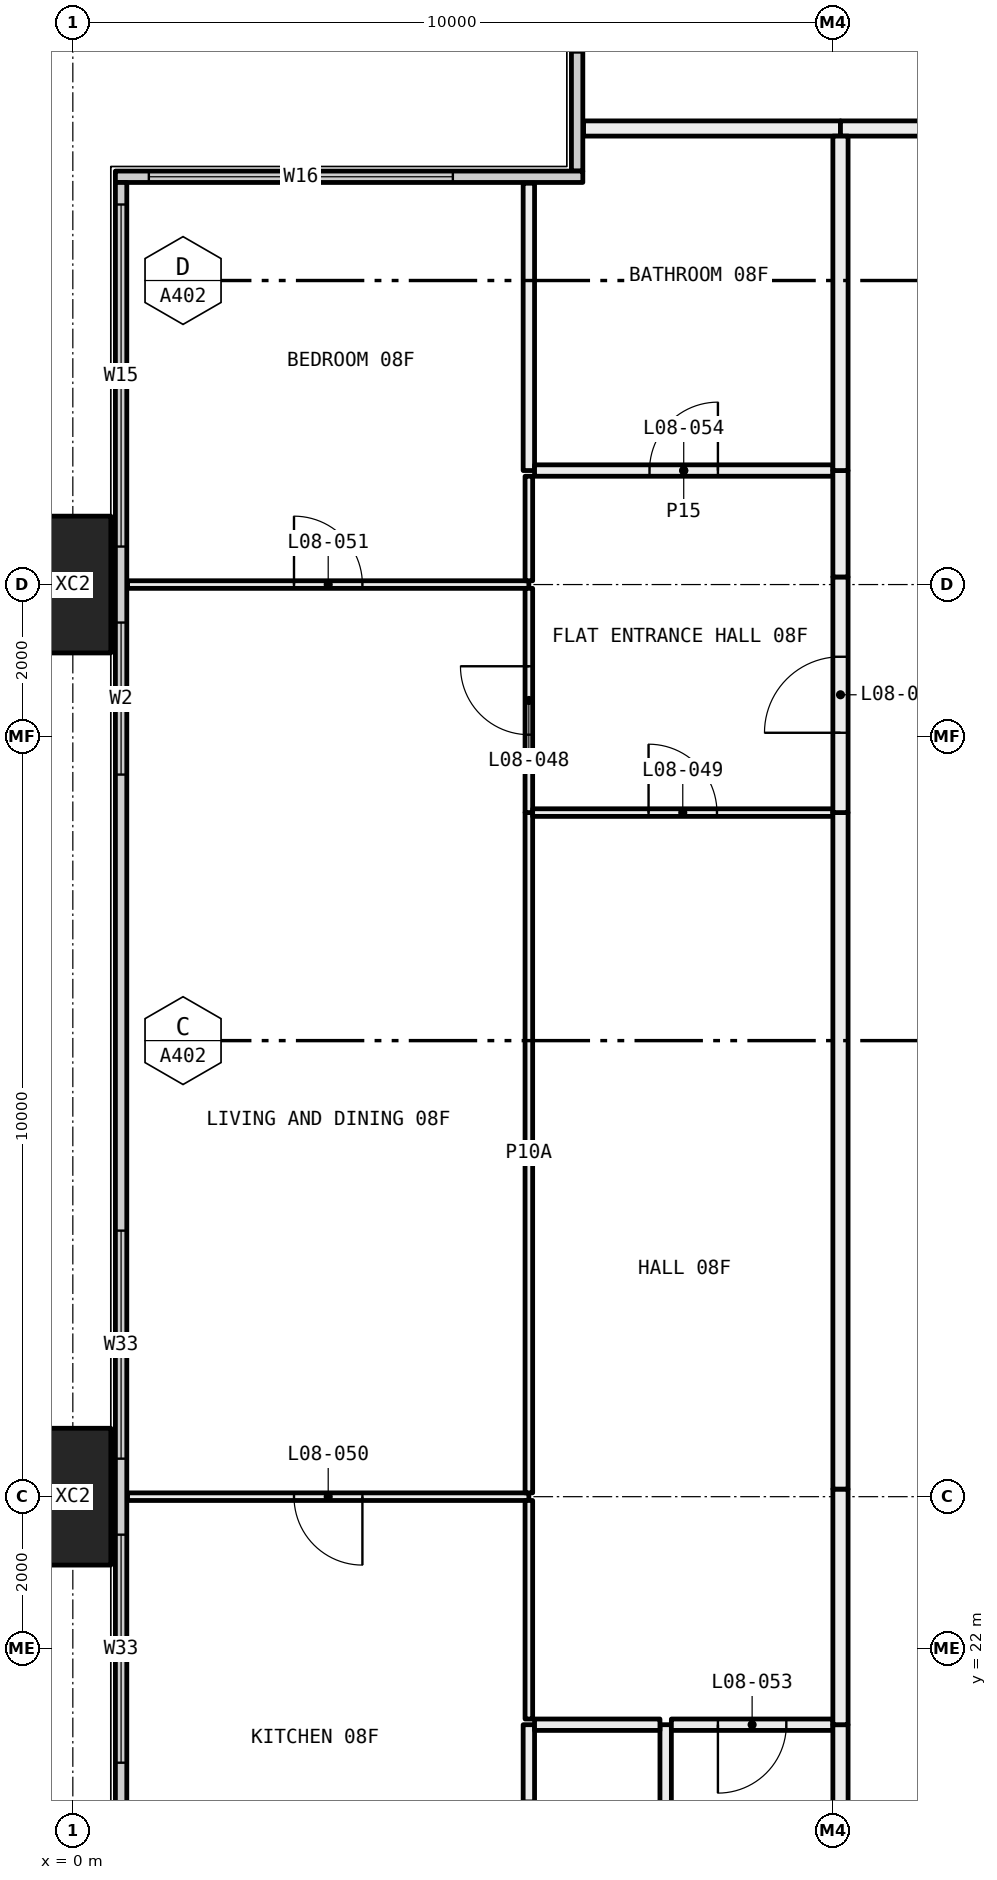
"""IFC4 building model, lengths in metres.
Left out: names, types, materials, properties, quantities, classifications, styles, units other than length and angle.
Written with IfcOpenShell. Run it as: python <this file> out.ifc"""

import sys

from ifc_helpers import new_model, si_unit, direction, frame, frame_2d, origin, origin_2d, place, context, subcontext, project, spatial, rectangle, hollow_rectangle, extrude, element, fill, save


model = new_model("IFC4")
c1 = context("Model", 3, precision=1e-05, world=origin(), true_north=direction((0.0, 1.0)))
c2 = subcontext(c1, "Body", "Model", "MODEL_VIEW")
j1 = project(units=[si_unit("LENGTHUNIT", "METRE"), si_unit("PLANEANGLEUNIT", "RADIAN")], contexts=[c1])
p1 = place(None, origin())
s1 = spatial("IfcSite", under=j1, at=p1, CompositionType="ELEMENT")
p2 = place(p1, origin())
s2 = spatial("IfcBuilding", under=s1, at=p2, CompositionType="ELEMENT")
p3 = place(p2, frame((0.0, 0.0, 40.35)))
s3 = spatial("IfcBuildingStorey", under=s2, at=p3, CompositionType="ELEMENT", Elevation=40.35)
for number, where, z_axis, x_axis in (
    (1, (0.0, 24.0, -0.4), (0.0, 0.0, 1.0), (0.0, 1.0, 0.0)),
    (2, (0.0, 36.0, -0.4), (0.0, 0.0, 1.0), (0.0, 1.0, 0.0)),
):
    element("IfcColumn", number, at=place(p3, frame(where, z_axis=z_axis, x_axis=x_axis)), inside=s3, PredefinedType="COLUMN", context=c2, shape_type="SweptSolid", body=[
        extrude(hollow_rectangle(XDim=1.8, YDim=1.0, WallThickness=0.07, at=origin_2d()), origin(), (0.0, 0.0, 1.0), 3.45),
    ])
p4 = place(p3, frame((6.635, 41.44, 0.0), z_axis=(0.0, 0.0, 1.0), x_axis=(0.0, 1.0, 0.0)))
e3 = element("IfcWall", 3, at=p4, inside=s3, PredefinedType="ELEMENTEDWALL", context=c2, shape_type="SweptSolid", body=[
    extrude(rectangle(XDim=5.85, YDim=0.15, at=frame_2d((2.925, 0.0))), origin(), (0.0, 0.0, 1.0), 3.05),
])
p5 = place(p4, frame((1.56, 0.0, 0.45)))
e4 = element("IfcOpeningElement", 4, at=p5, cuts=e3, PredefinedType="OPENING", context=c2, shape_type="SweptSolid", body=[
    extrude(rectangle(XDim=4.0, YDim=2.55, at=frame_2d((2.0, 1.275))), frame((0.0, 0.085, 0.0), z_axis=(0.0, -1.0, 0.0), x_axis=(1.0, 0.0, 0.0)), (0.0, 0.0, 1.0), 0.17),
])
p6 = place(p3, frame((0.56, 41.365, 0.0), z_axis=(0.0, 0.0, 1.0), x_axis=(1.0, 0.0, 0.0)))
e5 = element("IfcWall", 5, at=p6, inside=s3, PredefinedType="ELEMENTEDWALL", context=c2, shape_type="SweptSolid", body=[
    extrude(rectangle(XDim=6.15, YDim=0.15, at=frame_2d((3.075, 0.0))), origin(), (0.0, 0.0, 1.0), 3.05),
])
p7 = place(p6, frame((0.44, 0.0, 0.45)))
e6 = element("IfcOpeningElement", 6, at=p7, cuts=e5, PredefinedType="OPENING", context=c2, shape_type="SweptSolid", body=[
    extrude(rectangle(XDim=4.0, YDim=2.55, at=frame_2d((2.0, 1.275))), frame((0.0, 0.085, 0.0), z_axis=(0.0, -1.0, 0.0), x_axis=(1.0, 0.0, 0.0)), (0.0, 0.0, 1.0), 0.17),
])
p8 = place(p3, frame((0.635, 6.71, 0.0), z_axis=(0.0, 0.0, 1.0), x_axis=(0.0, 1.0, 0.0)))
e7 = element("IfcWall", 7, at=p8, inside=s3, PredefinedType="ELEMENTEDWALL", context=c2, shape_type="SweptSolid", body=[
    extrude(rectangle(XDim=34.58, YDim=0.15, at=frame_2d((17.29, 0.0))), origin(), (0.0, 0.0, 1.0), 3.05),
])
p9 = place(p8, frame((0.29, 0.0, 0.45)))
e8 = element("IfcOpeningElement", 8, at=p9, cuts=e7, PredefinedType="OPENING", context=c2, shape_type="SweptSolid", body=[
    extrude(rectangle(XDim=4.5, YDim=2.55, at=frame_2d((2.25, 1.275))), frame((0.0, 0.085, 0.0), z_axis=(0.0, -1.0, 0.0), x_axis=(1.0, 0.0, 0.0)), (0.0, 0.0, 1.0), 0.17),
])
p10 = place(p8, frame((5.79, 0.0, 0.45)))
e9 = element("IfcOpeningElement", 9, at=p10, cuts=e7, PredefinedType="OPENING", context=c2, shape_type="SweptSolid", body=[
    extrude(rectangle(XDim=3.0, YDim=2.55, at=frame_2d((1.5, 1.275))), frame((0.0, 0.085, 0.0), z_axis=(0.0, -1.0, 0.0), x_axis=(1.0, 0.0, 0.0)), (0.0, 0.0, 1.0), 0.17),
])
p11 = place(p8, frame((13.79, 0.0, 0.45)))
e10 = element("IfcOpeningElement", 10, at=p11, cuts=e7, PredefinedType="OPENING", context=c2, shape_type="SweptSolid", body=[
    extrude(rectangle(XDim=3.0, YDim=2.55, at=frame_2d((1.5, 1.275))), frame((0.0, 0.085, 0.0), z_axis=(0.0, -1.0, 0.0), x_axis=(1.0, 0.0, 0.0)), (0.0, 0.0, 1.0), 0.17),
])
p12 = place(p8, frame((17.79, 0.0, 0.45)))
e11 = element("IfcOpeningElement", 11, at=p12, cuts=e7, PredefinedType="OPENING", context=c2, shape_type="SweptSolid", body=[
    extrude(rectangle(XDim=3.0, YDim=2.55, at=frame_2d((1.5, 1.275))), frame((0.0, 0.085, 0.0), z_axis=(0.0, -1.0, 0.0), x_axis=(1.0, 0.0, 0.0)), (0.0, 0.0, 1.0), 0.17),
])
p13 = place(p8, frame((26.79, 0.0, 0.45)))
e12 = element("IfcOpeningElement", 12, at=p13, cuts=e7, PredefinedType="OPENING", context=c2, shape_type="SweptSolid", body=[
    extrude(rectangle(XDim=2.0, YDim=2.55, at=frame_2d((1.0, 1.275))), frame((0.0, 0.085, 0.0), z_axis=(0.0, -1.0, 0.0), x_axis=(1.0, 0.0, 0.0)), (0.0, 0.0, 1.0), 0.17),
])
p14 = place(p8, frame((29.79, 0.0, 0.45)))
e13 = element("IfcOpeningElement", 13, at=p14, cuts=e7, PredefinedType="OPENING", context=c2, shape_type="SweptSolid", body=[
    extrude(rectangle(XDim=4.5, YDim=2.55, at=frame_2d((2.25, 1.275))), frame((0.0, 0.085, 0.0), z_axis=(0.0, -1.0, 0.0), x_axis=(1.0, 0.0, 0.0)), (0.0, 0.0, 1.0), 0.17),
])
p15 = place(p3, frame((6.72, 42.0, 0.0), z_axis=(0.0, 0.0, 1.0), x_axis=(1.0, 0.0, 0.0)))
e14 = element("IfcWall", 14, at=p15, inside=s3, PredefinedType="PARTITIONING", context=c2, shape_type="SweptSolid", body=[
    extrude(rectangle(XDim=3.38, YDim=0.2, at=frame_2d((1.69, 0.0))), origin(), (0.0, 0.0, 1.0), 3.05),
])
p16 = place(p3, frame((10.1, 42.0, 0.0), z_axis=(0.0, 0.0, 1.0), x_axis=(1.0, 0.0, 0.0)))
e15 = element("IfcWall", 15, at=p16, inside=s3, PredefinedType="PARTITIONING", context=c2, shape_type="SweptSolid", body=[
    extrude(rectangle(XDim=1.9, YDim=0.2, at=frame_2d((0.95, 0.0))), origin(), (0.0, 0.0, 1.0), 3.05),
])
p17 = place(p3, frame((6.0, 24.0, 0.0), z_axis=(0.0, 0.0, 1.0), x_axis=(-1.0, 0.0, 0.0)))
e16 = element("IfcWall", 16, at=p17, inside=s3, PredefinedType="PARTITIONING", context=c2, shape_type="SweptSolid", body=[
    extrude(rectangle(XDim=5.28, YDim=0.1, at=frame_2d((2.64, 0.0))), origin(), (0.0, 0.0, 1.0), 2.45),
])
p18 = place(p17, frame((2.19, 0.0, 0.0)))
e17 = element("IfcOpeningElement", 17, at=p18, cuts=e16, PredefinedType="OPENING", context=c2, shape_type="SweptSolid", body=[
    extrude(rectangle(XDim=0.9, YDim=2.1, at=frame_2d((0.45, 1.05))), frame((0.0, 0.06, 0.0), z_axis=(0.0, -1.0, 0.0), x_axis=(1.0, 0.0, 0.0)), (0.0, 0.0, 1.0), 0.12),
])
p19 = place(p3, frame((6.0, 18.1, 0.0), z_axis=(0.0, 0.0, 1.0), x_axis=(0.0, 1.0, 0.0)))
e18 = element("IfcWall", 18, at=p19, inside=s3, PredefinedType="PARTITIONING", context=c2, shape_type="SweptSolid", body=[
    extrude(rectangle(XDim=2.9, YDim=0.15, at=frame_2d((1.45, 0.0))), origin(), (0.0, 0.0, 1.0), 3.05),
])
p20 = place(p19, frame((1.0, 0.0, 0.0)))
e19 = element("IfcOpeningElement", 19, at=p20, cuts=e18, PredefinedType="OPENING", context=c2, shape_type="SweptSolid", body=[
    extrude(rectangle(XDim=0.9, YDim=2.1, at=frame_2d((0.45, 1.05))), frame((0.0, 0.085, 0.0), z_axis=(0.0, -1.0, 0.0), x_axis=(1.0, 0.0, 0.0)), (0.0, 0.0, 1.0), 0.17),
])
p21 = place(p3, frame((6.0, 21.075, 0.0), z_axis=(0.0, 0.0, 1.0), x_axis=(0.0, 1.0, 0.0)))
e20 = element("IfcWall", 20, at=p21, inside=s3, PredefinedType="PARTITIONING", context=c2, shape_type="SweptSolid", body=[
    extrude(rectangle(XDim=2.875, YDim=0.1, at=frame_2d((1.438, 0.0))), origin(), (0.0, 0.0, 1.0), 2.45),
])
p22 = place(p3, frame((6.0, 36.0, 0.0), z_axis=(0.0, 0.0, 1.0), x_axis=(-1.0, 0.0, 0.0)))
e21 = element("IfcWall", 21, at=p22, inside=s3, PredefinedType="PARTITIONING", context=c2, shape_type="SweptSolid", body=[
    extrude(rectangle(XDim=5.28, YDim=0.1, at=frame_2d((2.64, 0.0))), origin(), (0.0, 0.0, 1.0), 2.45),
])
p23 = place(p22, frame((2.19, 0.0, 0.0)))
e22 = element("IfcOpeningElement", 22, at=p23, cuts=e21, PredefinedType="OPENING", context=c2, shape_type="SweptSolid", body=[
    extrude(rectangle(XDim=0.9, YDim=2.1, at=frame_2d((0.45, 1.05))), frame((0.0, 0.06, 0.0), z_axis=(0.0, -1.0, 0.0), x_axis=(1.0, 0.0, 0.0)), (0.0, 0.0, 1.0), 0.12),
])
p24 = place(p3, frame((6.0, 24.05, 0.0), z_axis=(0.0, 0.0, 1.0), x_axis=(0.0, 1.0, 0.0)))
e23 = element("IfcWall", 23, at=p24, inside=s3, PredefinedType="PARTITIONING", context=c2, shape_type="SweptSolid", body=[
    extrude(rectangle(XDim=8.95, YDim=0.1, at=frame_2d((4.475, 0.0))), origin(), (0.0, 0.0, 1.0), 2.45),
])
p25 = place(p3, frame((6.0, 33.0, 0.0), z_axis=(0.0, 0.0, 1.0), x_axis=(0.0, 1.0, 0.0)))
e24 = element("IfcWall", 24, at=p25, inside=s3, PredefinedType="PARTITIONING", context=c2, shape_type="SweptSolid", body=[
    extrude(rectangle(XDim=2.95, YDim=0.1, at=frame_2d((1.475, 0.0))), origin(), (0.0, 0.0, 1.0), 2.45),
])
p26 = place(p25, frame((1.025, 0.0, 0.0)))
e25 = element("IfcOpeningElement", 25, at=p26, cuts=e24, PredefinedType="OPENING", context=c2, shape_type="SweptSolid", body=[
    extrude(rectangle(XDim=0.9, YDim=2.1, at=frame_2d((0.45, 1.05))), frame((0.0, 0.06, 0.0), z_axis=(0.0, -1.0, 0.0), x_axis=(1.0, 0.0, 0.0)), (0.0, 0.0, 1.0), 0.12),
])
p27 = place(p3, frame((6.0, 36.05, 0.0), z_axis=(0.0, 0.0, 1.0), x_axis=(0.0, 1.0, 0.0)))
e26 = element("IfcWall", 26, at=p27, inside=s3, PredefinedType="PARTITIONING", context=c2, shape_type="SweptSolid", body=[
    extrude(rectangle(XDim=1.375, YDim=0.1, at=frame_2d((0.688, 0.0))), origin(), (0.0, 0.0, 1.0), 2.45),
])
p28 = place(p3, frame((6.0, 37.5, 0.0), z_axis=(0.0, 0.0, 1.0), x_axis=(0.0, 1.0, 0.0)))
e27 = element("IfcWall", 27, at=p28, inside=s3, PredefinedType="PARTITIONING", context=c2, shape_type="SweptSolid", body=[
    extrude(rectangle(XDim=3.78, YDim=0.15, at=frame_2d((1.89, 0.0))), origin(), (0.0, 0.0, 1.0), 3.05),
])
p29 = place(p3, frame((7.8, 18.1, 0.0), z_axis=(0.0, 0.0, 1.0), x_axis=(0.0, 1.0, 0.0)))
e28 = element("IfcWall", 28, at=p29, inside=s3, PredefinedType="PARTITIONING", context=c2, shape_type="SweptSolid", body=[
    extrude(rectangle(XDim=2.9, YDim=0.15, at=frame_2d((1.45, 0.0))), origin(), (0.0, 0.0, 1.0), 3.05),
])
p30 = place(p3, frame((7.725, 21.0, 0.0), z_axis=(0.0, 0.0, 1.0), x_axis=(-1.0, 0.0, 0.0)))
e29 = element("IfcWall", 29, at=p30, inside=s3, PredefinedType="PARTITIONING", context=c2, shape_type="SweptSolid", body=[
    extrude(rectangle(XDim=1.65, YDim=0.15, at=frame_2d((0.825, 0.0))), origin(), (0.0, 0.0, 1.0), 3.05),
])
p31 = place(p3, frame((10.0, 21.0, 0.0), z_axis=(0.0, 0.0, 1.0), x_axis=(-1.0, 0.0, 0.0)))
e30 = element("IfcWall", 30, at=p31, inside=s3, PredefinedType="PARTITIONING", context=c2, shape_type="SweptSolid", body=[
    extrude(rectangle(XDim=2.125, YDim=0.15, at=frame_2d((1.062, 0.0))), origin(), (0.0, 0.0, 1.0), 3.05),
])
p32 = place(p31, frame((0.613, 0.0, 0.0)))
e31 = element("IfcOpeningElement", 31, at=p32, cuts=e30, PredefinedType="OPENING", context=c2, shape_type="SweptSolid", body=[
    extrude(rectangle(XDim=0.9, YDim=2.1, at=frame_2d((0.45, 1.05))), frame((0.0, 0.085, 0.0), z_axis=(0.0, -1.0, 0.0), x_axis=(1.0, 0.0, 0.0)), (0.0, 0.0, 1.0), 0.17),
])
p33 = place(p3, frame((10.1, 18.1, 0.0), z_axis=(0.0, 0.0, 1.0), x_axis=(0.0, 1.0, 0.0)))
e32 = element("IfcWall", 32, at=p33, inside=s3, PredefinedType="PARTITIONING", context=c2, shape_type="SweptSolid", body=[
    extrude(rectangle(XDim=2.9, YDim=0.2, at=frame_2d((1.45, 0.0))), origin(), (0.0, 0.0, 1.0), 3.05),
])
p34 = place(p3, frame((10.0, 33.0, 0.0), z_axis=(0.0, 0.0, 1.0), x_axis=(-1.0, 0.0, 0.0)))
e33 = element("IfcWall", 33, at=p34, inside=s3, PredefinedType="PARTITIONING", context=c2, shape_type="SweptSolid", body=[
    extrude(rectangle(XDim=3.95, YDim=0.1, at=frame_2d((1.975, 0.0))), origin(), (0.0, 0.0, 1.0), 3.05),
])
p35 = place(p34, frame((1.525, 0.0, 0.0)))
e34 = element("IfcOpeningElement", 34, at=p35, cuts=e33, PredefinedType="OPENING", context=c2, shape_type="SweptSolid", body=[
    extrude(rectangle(XDim=0.9, YDim=2.1, at=frame_2d((0.45, 1.05))), frame((0.0, 0.06, 0.0), z_axis=(0.0, -1.0, 0.0), x_axis=(1.0, 0.0, 0.0)), (0.0, 0.0, 1.0), 0.12),
])
p36 = place(p3, frame((10.1, 21.0, 0.0), z_axis=(0.0, 0.0, 1.0), x_axis=(0.0, 1.0, 0.0)))
e35 = element("IfcWall", 35, at=p36, inside=s3, PredefinedType="PARTITIONING", context=c2, shape_type="SweptSolid", body=[
    extrude(rectangle(XDim=3.1, YDim=0.2, at=frame_2d((1.55, 0.0))), origin(), (0.0, 0.0, 1.0), 2.45),
])
p37 = place(p3, frame((10.1, 24.1, 0.0), z_axis=(0.0, 0.0, 1.0), x_axis=(0.0, 1.0, 0.0)))
e36 = element("IfcWall", 36, at=p37, inside=s3, PredefinedType="PARTITIONING", context=c2, shape_type="SweptSolid", body=[
    extrude(rectangle(XDim=8.9, YDim=0.2, at=frame_2d((4.45, 0.0))), origin(), (0.0, 0.0, 1.0), 3.05),
])
p38 = place(p3, frame((10.0, 37.5, 0.0), z_axis=(0.0, 0.0, 1.0), x_axis=(-1.0, 0.0, 0.0)))
e37 = element("IfcWall", 37, at=p38, inside=s3, PredefinedType="PARTITIONING", context=c2, shape_type="SweptSolid", body=[
    extrude(rectangle(XDim=3.925, YDim=0.15, at=frame_2d((1.962, 0.0))), origin(), (0.0, 0.0, 1.0), 3.05),
])
p39 = place(p38, frame((1.512, 0.0, 0.0)))
e38 = element("IfcOpeningElement", 38, at=p39, cuts=e37, PredefinedType="OPENING", context=c2, shape_type="SweptSolid", body=[
    extrude(rectangle(XDim=0.9, YDim=2.1, at=frame_2d((0.45, 1.05))), frame((0.0, 0.085, 0.0), z_axis=(0.0, -1.0, 0.0), x_axis=(1.0, 0.0, 0.0)), (0.0, 0.0, 1.0), 0.17),
])
p40 = place(p3, frame((10.1, 33.0, 0.0), z_axis=(0.0, 0.0, 1.0), x_axis=(0.0, 1.0, 0.0)))
e39 = element("IfcWall", 39, at=p40, inside=s3, PredefinedType="PARTITIONING", context=c2, shape_type="SweptSolid", body=[
    extrude(rectangle(XDim=3.1, YDim=0.2, at=frame_2d((1.55, 0.0))), origin(), (0.0, 0.0, 1.0), 2.45),
])
p41 = place(p40, frame((1.05, 0.0, 0.0)))
e40 = element("IfcOpeningElement", 40, at=p41, cuts=e39, PredefinedType="OPENING", context=c2, shape_type="SweptSolid", body=[
    extrude(rectangle(XDim=1.0, YDim=2.1, at=frame_2d((0.5, 1.05))), frame((0.0, 0.11, 0.0), z_axis=(0.0, -1.0, 0.0), x_axis=(1.0, 0.0, 0.0)), (0.0, 0.0, 1.0), 0.22),
])
p42 = place(p3, frame((10.1, 36.1, 0.0), z_axis=(0.0, 0.0, 1.0), x_axis=(0.0, 1.0, 0.0)))
e41 = element("IfcWall", 41, at=p42, inside=s3, PredefinedType="PARTITIONING", context=c2, shape_type="SweptSolid", body=[
    extrude(rectangle(XDim=1.4, YDim=0.2, at=frame_2d((0.7, 0.0))), origin(), (0.0, 0.0, 1.0), 3.05),
])
p43 = place(p3, frame((10.1, 37.5, 0.0), z_axis=(0.0, 0.0, 1.0), x_axis=(0.0, 1.0, 0.0)))
e42 = element("IfcWall", 42, at=p43, inside=s3, PredefinedType="PARTITIONING", context=c2, shape_type="SweptSolid", body=[
    extrude(rectangle(XDim=4.4, YDim=0.2, at=frame_2d((2.2, 0.0))), origin(), (0.0, 0.0, 1.0), 3.05),
])
p44 = place(p7, origin())
e43 = element("IfcWindow", 43, at=p44, inside=s3, PartitioningType="SINGLE_PANEL", PredefinedType="WINDOW", context=c2, shape_type="SweptSolid", body=[
    extrude(rectangle(XDim=4.0, YDim=2.55, at=frame_2d((2.0, 1.275))), frame((0.0, 0.03, 0.0), z_axis=(0.0, -1.0, 0.0), x_axis=(1.0, 0.0, 0.0)), (0.0, 0.0, 1.0), 0.06),
])
fill(e6, e43)
p45 = place(p11, origin())
e44 = element("IfcWindow", 44, at=p45, inside=s3, PartitioningType="SINGLE_PANEL", PredefinedType="WINDOW", context=c2, shape_type="SweptSolid", body=[
    extrude(rectangle(XDim=3.0, YDim=2.55, at=frame_2d((1.5, 1.275))), frame((0.0, 0.03, 0.0), z_axis=(0.0, -1.0, 0.0), x_axis=(1.0, 0.0, 0.0)), (0.0, 0.0, 1.0), 0.06),
])
fill(e10, e44)
p46 = place(p12, origin())
e45 = element("IfcWindow", 45, at=p46, inside=s3, PartitioningType="SINGLE_PANEL", PredefinedType="WINDOW", context=c2, shape_type="SweptSolid", body=[
    extrude(rectangle(XDim=3.0, YDim=2.55, at=frame_2d((1.5, 1.275))), frame((0.0, 0.03, 0.0), z_axis=(0.0, -1.0, 0.0), x_axis=(1.0, 0.0, 0.0)), (0.0, 0.0, 1.0), 0.06),
])
fill(e11, e45)
p47 = place(p13, origin())
e46 = element("IfcWindow", 46, at=p47, inside=s3, PartitioningType="SINGLE_PANEL", PredefinedType="WINDOW", context=c2, shape_type="SweptSolid", body=[
    extrude(rectangle(XDim=2.0, YDim=2.55, at=frame_2d((1.0, 1.275))), frame((0.0, 0.03, 0.0), z_axis=(0.0, -1.0, 0.0), x_axis=(1.0, 0.0, 0.0)), (0.0, 0.0, 1.0), 0.06),
])
fill(e12, e46)
p48 = place(p14, origin())
e47 = element("IfcWindow", 47, at=p48, inside=s3, PartitioningType="SINGLE_PANEL", PredefinedType="WINDOW", context=c2, shape_type="SweptSolid", body=[
    extrude(rectangle(XDim=4.5, YDim=2.55, at=frame_2d((2.25, 1.275))), frame((0.0, 0.03, 0.0), z_axis=(0.0, -1.0, 0.0), x_axis=(1.0, 0.0, 0.0)), (0.0, 0.0, 1.0), 0.06),
])
fill(e13, e47)
p49 = place(p41, origin())
e48 = element("IfcDoor", 48, at=p49, inside=s3, OperationType="SINGLE_SWING_RIGHT", PredefinedType="DOOR", context=c2, shape_type="SweptSolid", body=[
    extrude(rectangle(XDim=1.0, YDim=2.1, at=frame_2d((0.5, 1.05))), frame((0.0, 0.025, 0.0), z_axis=(0.0, -1.0, 0.0), x_axis=(1.0, 0.0, 0.0)), (0.0, 0.0, 1.0), 0.05),
])
fill(e40, e48)
p50 = place(p26, origin())
e49 = element("IfcDoor", 49, at=p50, inside=s3, OperationType="SINGLE_SWING_LEFT", PredefinedType="DOOR", context=c2, shape_type="SweptSolid", body=[
    extrude(rectangle(XDim=0.9, YDim=2.1, at=frame_2d((0.45, 1.05))), frame((0.0, 0.025, 0.0), z_axis=(0.0, -1.0, 0.0), x_axis=(1.0, 0.0, 0.0)), (0.0, 0.0, 1.0), 0.05),
])
fill(e25, e49)
p51 = place(p35, frame((0.9, 0.0, 0.0), x_axis=(-1.0, 0.0, 0.0)))
e50 = element("IfcDoor", 50, at=p51, inside=s3, OperationType="SINGLE_SWING_RIGHT", PredefinedType="DOOR", context=c2, shape_type="SweptSolid", body=[
    extrude(rectangle(XDim=0.9, YDim=2.1, at=frame_2d((0.45, 1.05))), frame((0.0, 0.025, 0.0), z_axis=(0.0, -1.0, 0.0), x_axis=(1.0, 0.0, 0.0)), (0.0, 0.0, 1.0), 0.05),
])
fill(e34, e50)
p52 = place(p18, origin())
e51 = element("IfcDoor", 51, at=p52, inside=s3, OperationType="SINGLE_SWING_RIGHT", PredefinedType="DOOR", context=c2, shape_type="SweptSolid", body=[
    extrude(rectangle(XDim=0.9, YDim=2.1, at=frame_2d((0.45, 1.05))), frame((0.0, 0.025, 0.0), z_axis=(0.0, -1.0, 0.0), x_axis=(1.0, 0.0, 0.0)), (0.0, 0.0, 1.0), 0.05),
])
fill(e17, e51)
p53 = place(p23, frame((0.9, 0.0, 0.0), x_axis=(-1.0, 0.0, 0.0)))
e52 = element("IfcDoor", 52, at=p53, inside=s3, OperationType="SINGLE_SWING_RIGHT", PredefinedType="DOOR", context=c2, shape_type="SweptSolid", body=[
    extrude(rectangle(XDim=0.9, YDim=2.1, at=frame_2d((0.45, 1.05))), frame((0.0, 0.025, 0.0), z_axis=(0.0, -1.0, 0.0), x_axis=(1.0, 0.0, 0.0)), (0.0, 0.0, 1.0), 0.05),
])
fill(e22, e52)
p54 = place(p32, origin())
e53 = element("IfcDoor", 53, at=p54, inside=s3, OperationType="SINGLE_SWING_LEFT", PredefinedType="DOOR", context=c2, shape_type="SweptSolid", body=[
    extrude(rectangle(XDim=0.9, YDim=2.1, at=frame_2d((0.45, 1.05))), frame((0.0, 0.025, 0.0), z_axis=(0.0, -1.0, 0.0), x_axis=(1.0, 0.0, 0.0)), (0.0, 0.0, 1.0), 0.05),
])
fill(e31, e53)
p55 = place(p39, frame((0.9, 0.0, 0.0), x_axis=(-1.0, 0.0, 0.0)))
e54 = element("IfcDoor", 54, at=p55, inside=s3, OperationType="SINGLE_SWING_LEFT", PredefinedType="DOOR", context=c2, shape_type="SweptSolid", body=[
    extrude(rectangle(XDim=0.9, YDim=2.1, at=frame_2d((0.45, 1.05))), frame((0.0, 0.025, 0.0), z_axis=(0.0, -1.0, 0.0), x_axis=(1.0, 0.0, 0.0)), (0.0, 0.0, 1.0), 0.05),
])
fill(e38, e54)
save(model, sys.argv[1])
